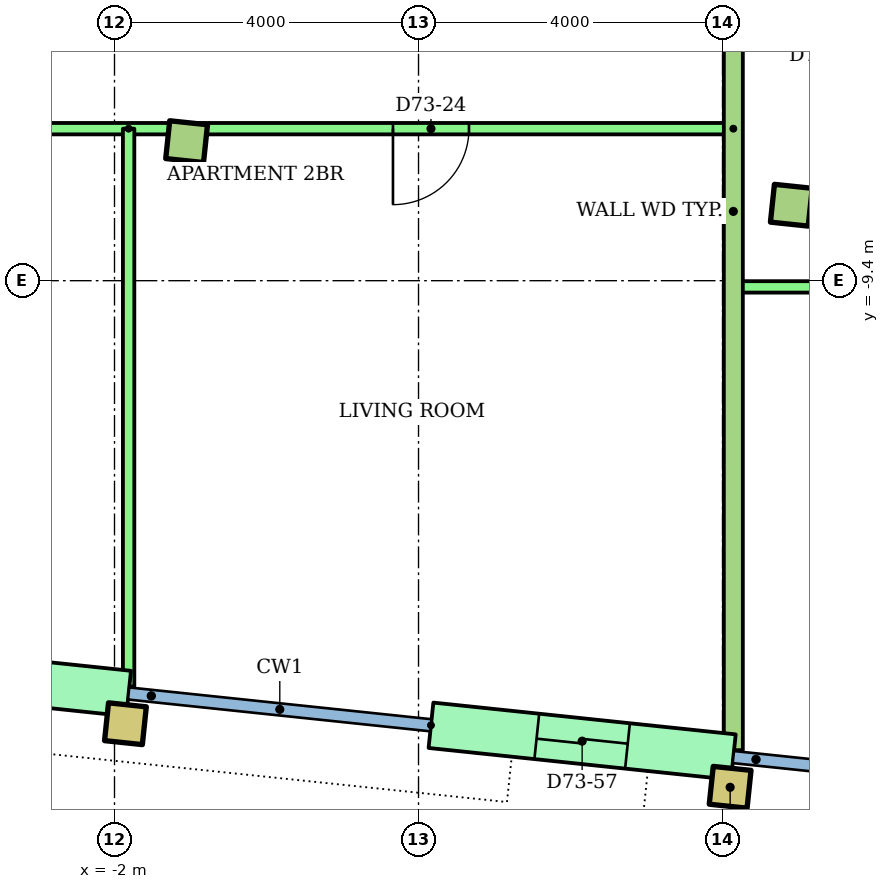
"""IFC4 building model, lengths in metres.
Left out: names, types, materials, properties, quantities, classifications, styles, units other than length and angle.
Written with IfcOpenShell. Run it as: python <this file> out.ifc"""

import sys

from ifc_helpers import new_model, si_unit, direction, frame, frame_2d, origin, origin_2d, place, context, subcontext, project, spatial, rectangle, hollow_rectangle, extrude, element, fill, save


model = new_model("IFC4")
c1 = context("Model", 3, precision=1e-05, world=origin(), true_north=direction((0.0, 1.0)))
c2 = subcontext(c1, "Body", "Model", "MODEL_VIEW")
j1 = project(units=[si_unit("LENGTHUNIT", "METRE"), si_unit("PLANEANGLEUNIT", "RADIAN")], contexts=[c1])
p1 = place(None, origin())
s1 = spatial("IfcSite", under=j1, at=p1, CompositionType="ELEMENT")
p2 = place(p1, origin())
s2 = spatial("IfcBuilding", under=s1, at=p2, CompositionType="ELEMENT")
p3 = place(p2, frame((0.0, 0.0, 278.7)))
s3 = spatial("IfcBuildingStorey", under=s2, at=p3, CompositionType="ELEMENT", Elevation=278.7)
for number, where, z_axis, x_axis in (
    (1, (-1.856, -15.229, 0.0), (0.0, 0.0, 1.0), (0.995, -0.105, 0.0)),
    (2, (6.1, -16.065, 0.0), (0.0, 0.0, 1.0), (0.995, -0.105, 0.0)),
):
    element("IfcColumn", number, at=place(p3, frame(where, z_axis=z_axis, x_axis=x_axis)), inside=s3, PredefinedType="COLUMN", context=c2, shape_type="SweptSolid", body=[
        extrude(hollow_rectangle(XDim=0.5, YDim=0.5, WallThickness=0.025, at=origin_2d()), origin(), (0.0, 0.0, 1.0), 3.2),
    ])
for number, where, z_axis, x_axis in (
    (3, (-1.051, -7.571, 0.0), (0.0, 0.0, 1.0), (0.995, -0.105, 0.0)),
    (4, (6.905, -8.407, 0.0), (0.0, 0.0, 1.0), (0.995, -0.105, 0.0)),
):
    element("IfcColumn", number, at=place(p3, frame(where, z_axis=z_axis, x_axis=x_axis)), inside=s3, PredefinedType="COLUMN", context=c2, shape_type="SweptSolid", body=[
        extrude(rectangle(XDim=0.5, YDim=0.5, at=origin_2d()), origin(), (0.0, 0.0, 1.0), 3.2),
    ])
p4 = place(p3, frame((-5.792, -14.413, 0.0), z_axis=(0.0, 0.0, 1.0), x_axis=(0.99452550138, -0.104494148666, 0.0)))
e5 = element("IfcWall", 5, at=p4, inside=s3, PredefinedType="STANDARD", context=c2, shape_type="SweptSolid", body=[
    extrude(rectangle(XDim=4.0, YDim=0.6, at=frame_2d((2.0, 0.0))), origin(), (0.0, 0.0, 1.0), 2.8),
])
p5 = place(p4, frame((1.4, 0.0, 0.0)))
e6 = element("IfcOpeningElement", 6, at=p5, cuts=e5, PredefinedType="OPENING", context=c2, shape_type="SweptSolid", body=[
    extrude(rectangle(XDim=1.2, YDim=2.1, at=frame_2d((0.6, 1.05))), frame((0.0, 0.31, 0.0), z_axis=(0.0, -1.0, 0.0), x_axis=(1.0, 0.0, 0.0)), (0.0, 0.0, 1.0), 0.62),
])
p6 = place(p3, frame((2.164, -15.249, 0.0), z_axis=(0.0, 0.0, 1.0), x_axis=(0.99452550138, -0.104494148666, 0.0)))
e7 = element("IfcWall", 7, at=p6, inside=s3, PredefinedType="STANDARD", context=c2, shape_type="SweptSolid", body=[
    extrude(rectangle(XDim=4.0, YDim=0.6, at=frame_2d((2.0, 0.0))), origin(), (0.0, 0.0, 1.0), 2.8),
])
p7 = place(p6, frame((1.4, 0.0, 0.0)))
e8 = element("IfcOpeningElement", 8, at=p7, cuts=e7, PredefinedType="OPENING", context=c2, shape_type="SweptSolid", body=[
    extrude(rectangle(XDim=1.2, YDim=2.1, at=frame_2d((0.6, 1.05))), frame((0.0, 0.31, 0.0), z_axis=(0.0, -1.0, 0.0), x_axis=(1.0, 0.0, 0.0)), (0.0, 0.0, 1.0), 0.62),
])
p8 = place(p3, frame((6.142, -7.4, 0.0), z_axis=(0.0, 0.0, 1.0), x_axis=(-1.0, 0.0, 0.0)))
e9 = element("IfcWall", 9, at=p8, inside=s3, PredefinedType="PARTITIONING", context=c2, shape_type="SweptSolid", body=[
    extrude(rectangle(XDim=15.912, YDim=0.15, at=frame_2d((7.956, 0.0))), origin(), (0.0, 0.0, 1.0), 2.4),
])
p9 = place(p8, frame((12.252, 0.0, 0.0)))
e10 = element("IfcOpeningElement", 10, at=p9, cuts=e9, PredefinedType="OPENING", context=c2, shape_type="SweptSolid", body=[
    extrude(rectangle(XDim=0.9, YDim=2.1, at=frame_2d((0.45, 1.05))), frame((0.0, 0.085, 0.0), z_axis=(0.0, -1.0, 0.0), x_axis=(1.0, 0.0, 0.0)), (0.0, 0.0, 1.0), 0.17),
])
p10 = place(p8, frame((9.495, 0.0, 0.0)))
e11 = element("IfcOpeningElement", 11, at=p10, cuts=e9, PredefinedType="OPENING", context=c2, shape_type="SweptSolid", body=[
    extrude(rectangle(XDim=0.9, YDim=2.1, at=frame_2d((0.45, 1.05))), frame((0.0, 0.085, 0.0), z_axis=(0.0, -1.0, 0.0), x_axis=(1.0, 0.0, 0.0)), (0.0, 0.0, 1.0), 0.17),
])
p11 = place(p8, frame((3.478, 0.0, 0.0)))
e12 = element("IfcOpeningElement", 12, at=p11, cuts=e9, PredefinedType="OPENING", context=c2, shape_type="SweptSolid", body=[
    extrude(rectangle(XDim=1.0, YDim=2.1, at=frame_2d((0.5, 1.05))), frame((0.0, 0.085, 0.0), z_axis=(0.0, -1.0, 0.0), x_axis=(1.0, 0.0, 0.0)), (0.0, 0.0, 1.0), 0.17),
])
p12 = place(p3, frame((-1.814, -7.4, 0.0), z_axis=(0.0, 0.0, 1.0), x_axis=(0.0, -1.0, 0.0)))
e13 = element("IfcWall", 13, at=p12, inside=s3, PredefinedType="PARTITIONING", context=c2, shape_type="SweptSolid", body=[
    extrude(rectangle(XDim=7.341, YDim=0.15, at=frame_2d((3.67, 0.0))), origin(), (0.0, 0.0, 1.0), 2.4),
])
p13 = place(p3, frame((29.94, -9.482, 0.0), z_axis=(0.0, 0.0, 1.0), x_axis=(-1.0, 0.0, 0.0)))
e14 = element("IfcWall", 14, at=p13, inside=s3, PredefinedType="PARTITIONING", context=c2, shape_type="SweptSolid", body=[
    extrude(rectangle(XDim=23.798, YDim=0.15, at=frame_2d((11.899, 0.0))), origin(), (0.0, 0.0, 1.0), 2.4),
])
p14 = place(p13, frame((19.32, 0.0, 0.0)))
e15 = element("IfcOpeningElement", 15, at=p14, cuts=e14, PredefinedType="OPENING", context=c2, shape_type="SweptSolid", body=[
    extrude(rectangle(XDim=1.0, YDim=2.1, at=frame_2d((0.5, 1.05))), frame((0.0, 0.085, 0.0), z_axis=(0.0, -1.0, 0.0), x_axis=(1.0, 0.0, 0.0)), (0.0, 0.0, 1.0), 0.17),
])
p15 = place(p13, frame((13.403, 0.0, 0.0)))
e16 = element("IfcOpeningElement", 16, at=p15, cuts=e14, PredefinedType="OPENING", context=c2, shape_type="SweptSolid", body=[
    extrude(rectangle(XDim=0.9, YDim=2.1, at=frame_2d((0.45, 1.05))), frame((0.0, 0.085, 0.0), z_axis=(0.0, -1.0, 0.0), x_axis=(1.0, 0.0, 0.0)), (0.0, 0.0, 1.0), 0.17),
])
p16 = place(p13, frame((9.425, 0.0, 0.0)))
e17 = element("IfcOpeningElement", 17, at=p16, cuts=e14, PredefinedType="OPENING", context=c2, shape_type="SweptSolid", body=[
    extrude(rectangle(XDim=0.9, YDim=2.1, at=frame_2d((0.45, 1.05))), frame((0.0, 0.085, 0.0), z_axis=(0.0, -1.0, 0.0), x_axis=(1.0, 0.0, 0.0)), (0.0, 0.0, 1.0), 0.17),
])
p17 = place(p13, frame((2.434, 0.0, 0.0)))
e18 = element("IfcOpeningElement", 18, at=p17, cuts=e14, PredefinedType="OPENING", context=c2, shape_type="SweptSolid", body=[
    extrude(rectangle(XDim=0.9, YDim=2.1, at=frame_2d((0.45, 1.05))), frame((0.0, 0.085, 0.0), z_axis=(0.0, -1.0, 0.0), x_axis=(1.0, 0.0, 0.0)), (0.0, 0.0, 1.0), 0.17),
])
p18 = place(p3, frame((6.142, -1.4, 0.0), z_axis=(0.0, 0.0, 1.0), x_axis=(0.0, -1.0, 0.0)))
e19 = element("IfcWall", 19, at=p18, inside=s3, PredefinedType="PARTITIONING", context=c2, shape_type="SweptSolid", body=[
    extrude(rectangle(XDim=14.177, YDim=0.25, at=frame_2d((7.088, 0.0))), origin(), (0.0, 0.0, 1.0), 2.4),
])
p19 = place(p11, origin())
e20 = element("IfcDoor", 20, at=p19, inside=s3, OperationType="SINGLE_SWING_RIGHT", PredefinedType="DOOR", context=c2, shape_type="SweptSolid", body=[
    extrude(rectangle(XDim=1.0, YDim=2.1, at=frame_2d((0.5, 1.05))), frame((0.0, 0.025, 0.0), z_axis=(0.0, -1.0, 0.0), x_axis=(1.0, 0.0, 0.0)), (0.0, 0.0, 1.0), 0.05),
])
fill(e12, e20)
p20 = place(p7, origin())
e21 = element("IfcDoor", 21, at=p20, inside=s3, OperationType="SLIDING_TO_LEFT", PredefinedType="DOOR", context=c2, shape_type="SweptSolid", body=[
    extrude(rectangle(XDim=1.2, YDim=2.1, at=frame_2d((0.6, 1.05))), frame((0.0, 0.025, 0.0), z_axis=(0.0, -1.0, 0.0), x_axis=(1.0, 0.0, 0.0)), (0.0, 0.0, 1.0), 0.05),
])
fill(e8, e21)
save(model, sys.argv[1])
